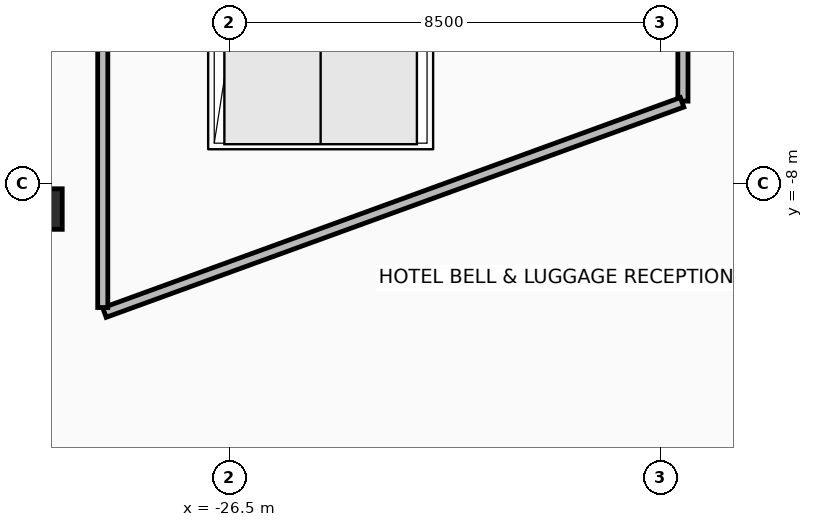
"""IFC4 building model, lengths in metres.
Left out: names, types, materials, properties, quantities, classifications, styles, units other than length and angle.
Written with IfcOpenShell. Run it as: python <this file> out.ifc"""

import sys

from ifc_helpers import new_model, si_unit, direction, frame, frame_2d, origin, origin_2d, place, context, subcontext, project, spatial, rectangle, hollow_rectangle, extrude, element, save


model = new_model("IFC4")
c1 = context("Model", 3, precision=1e-05, world=origin(), true_north=direction((0.0, 1.0)))
c2 = subcontext(c1, "Body", "Model", "MODEL_VIEW")
j1 = project(units=[si_unit("LENGTHUNIT", "METRE"), si_unit("PLANEANGLEUNIT", "RADIAN")], contexts=[c1])
p1 = place(None, origin())
s1 = spatial("IfcSite", under=j1, at=p1, CompositionType="ELEMENT")
p2 = place(p1, origin())
s2 = spatial("IfcBuilding", under=s1, at=p2, CompositionType="ELEMENT")
p3 = place(p2, origin())
s3 = spatial("IfcBuildingStorey", under=s2, at=p3, CompositionType="ELEMENT", Elevation=0.0)
p4 = place(p3, frame((-30.2, -8.5, 0.0), z_axis=(0.0, 0.0, 1.0), x_axis=(1.0, 0.0, 0.0)))
e1 = element("IfcColumn", 1, at=p4, inside=s3, PredefinedType="COLUMN", context=c2, shape_type="SweptSolid", body=[
    extrude(hollow_rectangle(XDim=0.8, YDim=0.8, WallThickness=0.045, at=origin_2d()), origin(), (0.0, 0.0, 1.0), 5.5),
])
p5 = place(p3, frame((-17.55, 12.349, 0.0), z_axis=(0.0, 0.0, 1.0), x_axis=(0.0, -1.0, 0.0)))
e2 = element("IfcWall", 2, at=p5, inside=s3, PredefinedType="PARTITIONING", context=c2, shape_type="SweptSolid", body=[
    extrude(rectangle(XDim=18.719, YDim=0.2, at=frame_2d((9.36, 0.0))), origin(), (0.0, 0.0, 1.0), 4.565),
])
p6 = place(p3, frame((-17.566, -6.394, 0.0), z_axis=(0.0, 0.0, 1.0), x_axis=(-0.93969408329, -0.342016125102, 0.0)))
e3 = element("IfcWall", 3, at=p6, inside=s3, PredefinedType="PARTITIONING", context=c2, shape_type="SweptSolid", body=[
    extrude(rectangle(XDim=12.132, YDim=0.2, at=frame_2d((6.066, 0.0))), origin(), (0.0, 0.0, 1.0), 4.565),
])
p7 = place(p3, frame((-29.0, -10.443, 0.0), z_axis=(0.0, 0.0, 1.0), x_axis=(0.0, 1.0, 0.0)))
e4 = element("IfcWall", 4, at=p7, inside=s3, PredefinedType="PARTITIONING", context=c2, shape_type="SweptSolid", body=[
    extrude(rectangle(XDim=26.443, YDim=0.2, at=frame_2d((13.221, 0.0))), origin(), (0.0, 0.0, 1.0), 4.565),
])
p8 = place(p7, frame((12.621, 0.0, 0.0)))
e5 = element("IfcOpeningElement", 5, at=p8, cuts=e4, PredefinedType="OPENING", context=c2, shape_type="SweptSolid", body=[
    extrude(rectangle(XDim=1.2, YDim=2.15, at=frame_2d((0.6, 1.075))), frame((0.0, 0.11, 0.0), z_axis=(0.0, -1.0, 0.0), x_axis=(1.0, 0.0, 0.0)), (0.0, 0.0, 1.0), 0.22),
])
save(model, sys.argv[1])
